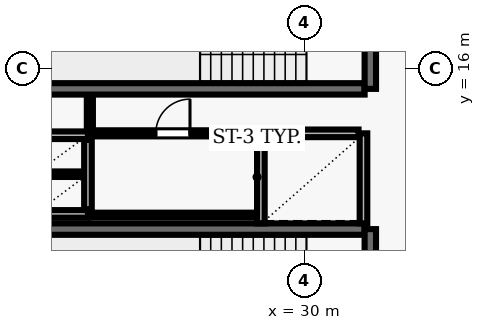
"""IFC4 building model, lengths in metres.
Left out: names, types, materials, properties, quantities, classifications, styles, units other than length and angle.
Written with IfcOpenShell. Run it as: python <this file> out.ifc"""

import sys

from ifc_helpers import new_model, si_unit, direction, frame, frame_2d, origin, place, context, subcontext, project, spatial, rectangle, extrude, element, fill, save


model = new_model("IFC4")
c1 = context("Model", 3, precision=1e-05, world=origin(), true_north=direction((0.0, 1.0)))
c2 = subcontext(c1, "Body", "Model", "MODEL_VIEW")
j1 = project(units=[si_unit("LENGTHUNIT", "METRE"), si_unit("PLANEANGLEUNIT", "RADIAN")], contexts=[c1])
p1 = place(None, origin())
s1 = spatial("IfcSite", under=j1, at=p1, CompositionType="ELEMENT")
p2 = place(p1, origin())
s2 = spatial("IfcBuilding", under=s1, at=p2, CompositionType="ELEMENT")
p3 = place(p2, frame((0.0, 0.0, 77.8)))
s3 = spatial("IfcBuildingStorey", under=s2, at=p3, CompositionType="ELEMENT", Elevation=77.8)
p4 = place(p3, frame((23.22, 15.47, 0.0), z_axis=(0.0, 0.0, 1.0), x_axis=(1.0, 0.0, 0.0)))
e1 = element("IfcWall", 1, at=p4, inside=s3, PredefinedType="SHEAR", context=c2, shape_type="SweptSolid", body=[
    extrude(rectangle(XDim=8.36, YDim=0.3, at=frame_2d((4.18, 0.0))), origin(), (0.0, 0.0, 1.0), 3.69),
])
p5 = place(p3, frame((31.73, 15.47, 0.0), z_axis=(0.0, 0.0, 1.0), x_axis=(0.0, 1.0, 0.0)))
e2 = element("IfcWall", 2, at=p5, inside=s3, PredefinedType="SHEAR", context=c2, shape_type="SweptSolid", body=[
    extrude(rectangle(XDim=3.51, YDim=0.3, at=frame_2d((1.755, 0.0))), origin(), (0.0, 0.0, 1.0), 3.69),
])
p6 = place(p5, frame((1.18, 0.0, 0.0)))
e3 = element("IfcOpeningElement", 3, at=p6, cuts=e2, PredefinedType="OPENING", context=c2, shape_type="SweptSolid", body=[
    extrude(rectangle(XDim=1.15, YDim=2.15, at=frame_2d((0.575, 1.075))), frame((0.0, 0.16, 0.0), z_axis=(0.0, -1.0, 0.0), x_axis=(1.0, 0.0, 0.0)), (0.0, 0.0, 1.0), 0.32),
])
p7 = place(p3, frame((31.58, 11.78, 0.0), z_axis=(0.0, 0.0, 1.0), x_axis=(-1.0, 0.0, 0.0)))
e4 = element("IfcWall", 4, at=p7, inside=s3, PredefinedType="SHEAR", context=c2, shape_type="SweptSolid", body=[
    extrude(rectangle(XDim=8.36, YDim=0.3, at=frame_2d((4.18, 0.0))), origin(), (0.0, 0.0, 1.0), 3.69),
])
p8 = place(p3, frame((31.73, 8.27, 0.0), z_axis=(0.0, 0.0, 1.0), x_axis=(0.0, 1.0, 0.0)))
e5 = element("IfcWall", 5, at=p8, inside=s3, PredefinedType="SHEAR", context=c2, shape_type="SweptSolid", body=[
    extrude(rectangle(XDim=3.51, YDim=0.3, at=frame_2d((1.755, 0.0))), origin(), (0.0, 0.0, 1.0), 3.69),
])
p9 = place(p8, frame((1.18, 0.0, 0.0)))
e6 = element("IfcOpeningElement", 6, at=p9, cuts=e5, PredefinedType="OPENING", context=c2, shape_type="SweptSolid", body=[
    extrude(rectangle(XDim=1.15, YDim=2.15, at=frame_2d((0.575, 1.075))), frame((0.0, 0.16, 0.0), z_axis=(0.0, -1.0, 0.0), x_axis=(1.0, 0.0, 0.0)), (0.0, 0.0, 1.0), 0.32),
])
for number, where, z_axis, x_axis in (
    (7, (28.85, 14.3, 0.0), (0.0, 0.0, 1.0), (0.0, -1.0, 0.0)),
    (8, (31.55, 11.93, 0.0), (0.0, 0.0, 1.0), (0.0, 1.0, 0.0)),
):
    element("IfcWall", number, at=place(p3, frame(where, z_axis=z_axis, x_axis=x_axis)), inside=s3, PredefinedType="SOLIDWALL", context=c2, shape_type="SweptSolid", body=[
        extrude(rectangle(XDim=2.37, YDim=0.2, at=frame_2d((1.185, 0.0))), origin(), (0.0, 0.0, 1.0), 3.69),
    ])
p10 = place(p3, frame((31.42, 14.3, 0.0), z_axis=(0.0, 0.0, 1.0), x_axis=(-1.0, 0.0, 0.0)))
e9 = element("IfcWall", 9, at=p10, inside=s3, PredefinedType="SOLIDWALL", context=c2, shape_type="SweptSolid", body=[
    extrude(rectangle(XDim=2.44, YDim=0.2, at=frame_2d((1.22, 0.0))), origin(), (0.0, 0.0, 1.0), 3.69),
])
for number, where, z_axis, x_axis in (
    (10, (22.9, 14.25, 0.0), (0.0, 0.0, 1.0), (1.0, 0.0, 0.0)),
    (11, (22.9, 12.18, 0.0), (0.0, 0.0, 1.0), (1.0, 0.0, 0.0)),
):
    element("IfcWall", number, at=place(p3, frame(where, z_axis=z_axis, x_axis=x_axis)), inside=s3, PredefinedType="SOLIDWALL", context=c2, shape_type="SweptSolid", body=[
        extrude(rectangle(XDim=1.4, YDim=0.2, at=frame_2d((0.7, 0.0))), origin(), (0.0, 0.0, 1.0), 3.69),
    ])
p11 = place(p3, frame((24.3, 12.3, 0.0), z_axis=(0.0, 0.0, 1.0), x_axis=(0.0, 1.0, 0.0)))
e12 = element("IfcWall", 12, at=p11, inside=s3, PredefinedType="SOLIDWALL", context=c2, shape_type="SweptSolid", body=[
    extrude(rectangle(XDim=1.83, YDim=0.2, at=frame_2d((0.915, 0.0))), origin(), (0.0, 0.0, 1.0), 3.69),
])
p12 = place(p3, frame((23.01, 13.225, 0.0), z_axis=(0.0, 0.0, 1.0), x_axis=(1.0, 0.0, 0.0)))
e13 = element("IfcWall", 13, at=p12, inside=s3, PredefinedType="PARTITIONING", context=c2, shape_type="SweptSolid", body=[
    extrude(rectangle(XDim=1.18, YDim=0.145, at=frame_2d((0.59, 0.0))), origin(), (0.0, 0.0, 1.0), 3.69),
])
p13 = place(p3, frame((24.35, 12.15, 0.0), z_axis=(0.0, 0.0, 1.0), x_axis=(1.0, 0.0, 0.0)))
e14 = element("IfcWall", 14, at=p13, inside=s3, PredefinedType="PARTITIONING", context=c2, shape_type="SweptSolid", body=[
    extrude(rectangle(XDim=4.37, YDim=0.125, at=frame_2d((2.185, 0.0))), origin(), (0.0, 0.0, 1.0), 3.69),
])
p14 = place(p3, frame((24.35, 14.3, 0.0), z_axis=(0.0, 0.0, 1.0), x_axis=(1.0, 0.0, 0.0)))
e15 = element("IfcWall", 15, at=p14, inside=s3, PredefinedType="PARTITIONING", context=c2, shape_type="SweptSolid", body=[
    extrude(rectangle(XDim=4.37, YDim=0.16, at=frame_2d((2.185, 0.0))), origin(), (0.0, 0.0, 1.0), 3.69),
])
p15 = place(p14, frame((1.735, 0.0, 0.0)))
e16 = element("IfcOpeningElement", 16, at=p15, cuts=e15, PredefinedType="OPENING", context=c2, shape_type="SweptSolid", body=[
    extrude(rectangle(XDim=0.9, YDim=2.1, at=frame_2d((0.45, 1.05))), frame((0.0, 0.09, 0.0), z_axis=(0.0, -1.0, 0.0), x_axis=(1.0, 0.0, 0.0)), (0.0, 0.0, 1.0), 0.18),
])
p16 = place(p3, frame((24.35, 15.29, 0.0), z_axis=(0.0, 0.0, 1.0), x_axis=(0.0, -1.0, 0.0)))
e17 = element("IfcWall", 17, at=p16, inside=s3, PredefinedType="PARTITIONING", context=c2, shape_type="SweptSolid", body=[
    extrude(rectangle(XDim=0.915, YDim=0.16, at=frame_2d((0.458, 0.0))), origin(), (0.0, 0.0, 1.0), 3.69),
])
p17 = place(p15, origin())
e18 = element("IfcDoor", 18, at=p17, inside=s3, OperationType="SINGLE_SWING_RIGHT", PredefinedType="DOOR", context=c2, shape_type="SweptSolid", body=[
    extrude(rectangle(XDim=0.9, YDim=2.1, at=frame_2d((0.45, 1.05))), frame((0.0, 0.025, 0.0), z_axis=(0.0, -1.0, 0.0), x_axis=(1.0, 0.0, 0.0)), (0.0, 0.0, 1.0), 0.05),
])
fill(e16, e18)
save(model, sys.argv[1])
